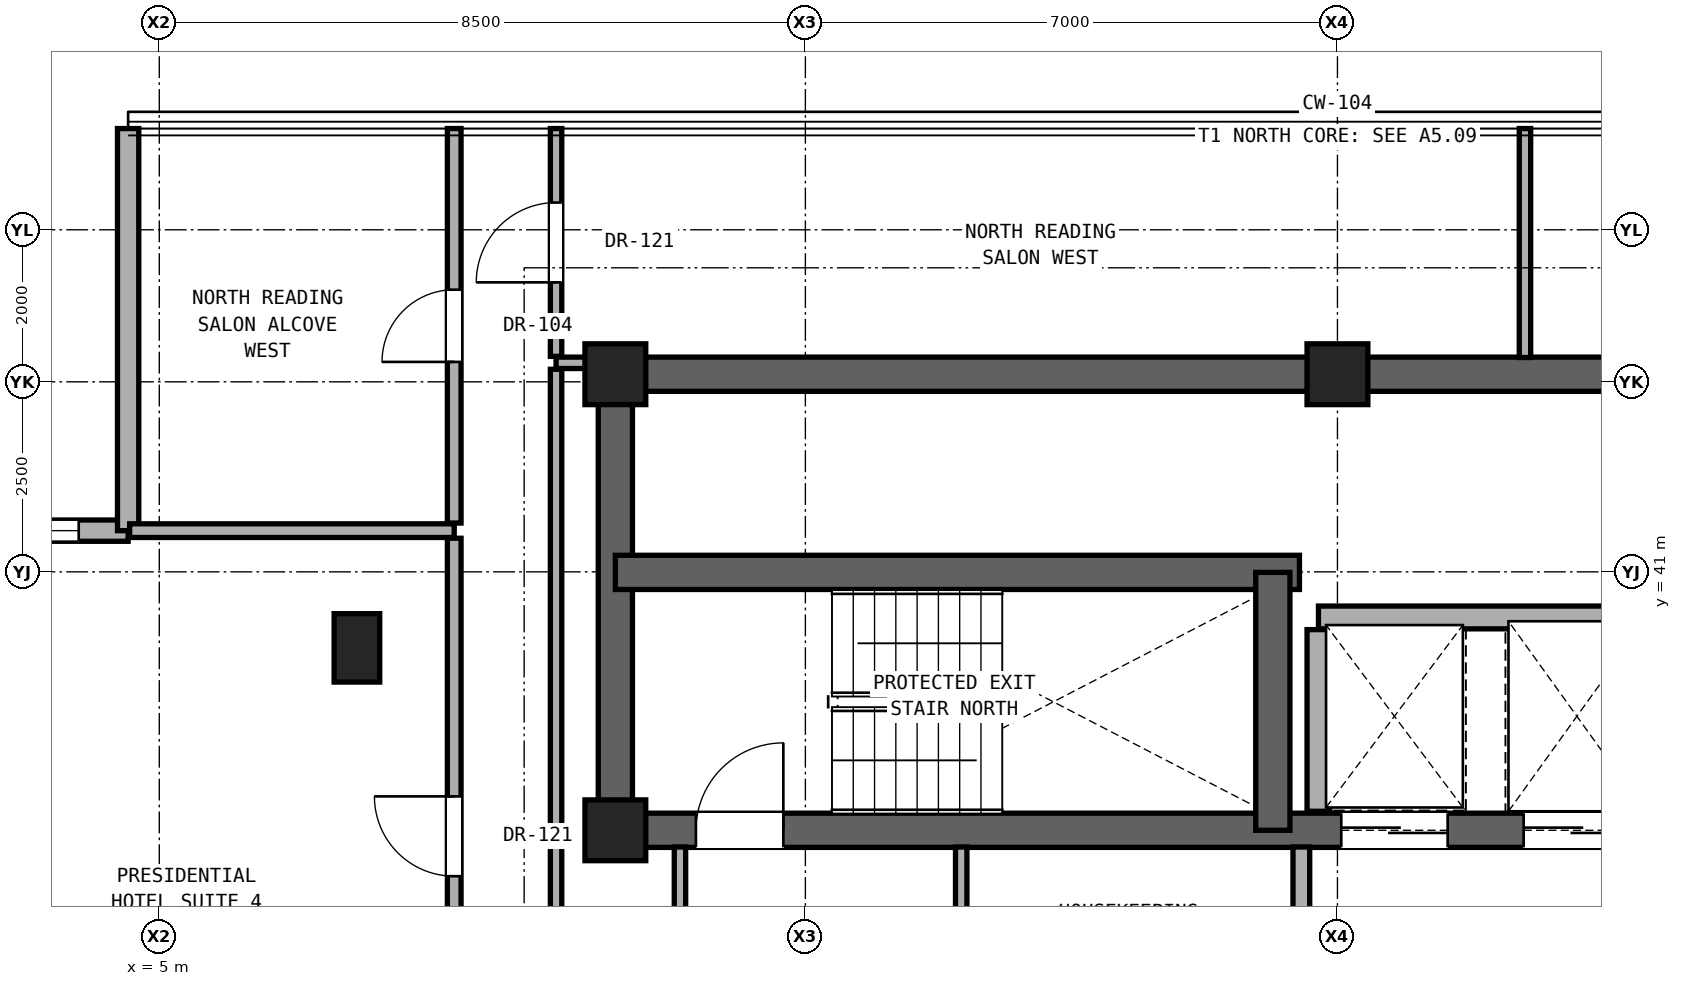
"""IFC4 building model, lengths in metres.
Left out: names, types, materials, properties, quantities, classifications, styles, units other than length and angle.
Written with IfcOpenShell. Run it as: python <this file> out.ifc"""

import sys

from ifc_helpers import new_model, si_unit, direction, frame, frame_2d, origin, origin_2d, place, context, subcontext, project, spatial, rectangle, extrude, element, fill, save


model = new_model("IFC4")
c1 = context("Model", 3, precision=1e-05, world=origin(), true_north=direction((0.0, 1.0)))
c2 = subcontext(c1, "Body", "Model", "MODEL_VIEW")
j1 = project(units=[si_unit("LENGTHUNIT", "METRE"), si_unit("PLANEANGLEUNIT", "RADIAN")], contexts=[c1])
p1 = place(None, origin())
s1 = spatial("IfcSite", under=j1, at=p1, CompositionType="ELEMENT")
p2 = place(p1, origin())
s2 = spatial("IfcBuilding", under=s1, at=p2, CompositionType="ELEMENT")
p3 = place(p2, frame((0.0, 0.0, 232.6)))
s3 = spatial("IfcBuildingStorey", under=s2, at=p3, CompositionType="ELEMENT", Elevation=232.6)
for number, where, z_axis, x_axis in (
    (1, (11.0, 37.6, 0.0), (0.0, 0.0, 1.0), (1.0, 0.0, 0.0)),
    (2, (11.0, 43.6, 0.0), (0.0, 0.0, 1.0), (1.0, 0.0, 0.0)),
    (3, (20.5, 43.6, 0.0), (0.0, 0.0, 1.0), (1.0, 0.0, 0.0)),
):
    element("IfcColumn", number, at=place(p3, frame(where, z_axis=z_axis, x_axis=x_axis)), inside=s3, PredefinedType="COLUMN", context=c2, shape_type="SweptSolid", body=[
        extrude(rectangle(XDim=0.8, YDim=0.8, at=origin_2d()), origin(), (0.0, 0.0, 1.0), 3.3),
    ])
p4 = place(p3, frame((7.6, 40.0, 0.0), z_axis=(0.0, 0.0, 1.0), x_axis=(1.0, 0.0, 0.0)))
e4 = element("IfcColumn", 4, at=p4, inside=s3, PredefinedType="PILASTER", context=c2, shape_type="SweptSolid", body=[
    extrude(rectangle(XDim=0.6, YDim=0.9, at=origin_2d()), origin(), (0.0, 0.0, 1.0), 3.3),
])
p5 = place(p3, frame((11.0, 43.6, 0.0), z_axis=(0.0, 0.0, 1.0), x_axis=(1.0, 0.0, 0.0)))
e5 = element("IfcWall", 5, at=p5, inside=s3, PredefinedType="SHEAR", context=c2, shape_type="SweptSolid", body=[
    extrude(rectangle(XDim=19.0, YDim=0.45, at=frame_2d((9.5, 0.0))), origin(), (0.0, 0.0, 1.0), 3.1),
])
p6 = place(p3, frame((11.0, 37.6, 0.0), z_axis=(0.0, 0.0, 1.0), x_axis=(0.0, 1.0, 0.0)))
e6 = element("IfcWall", 6, at=p6, inside=s3, PredefinedType="SHEAR", context=c2, shape_type="SweptSolid", body=[
    extrude(rectangle(XDim=6.0, YDim=0.45, at=frame_2d((3.0, 0.0))), origin(), (0.0, 0.0, 1.0), 3.1),
])
p7 = place(p3, frame((11.0, 37.6, 0.0), z_axis=(0.0, 0.0, 1.0), x_axis=(1.0, 0.0, 0.0)))
e7 = element("IfcWall", 7, at=p7, inside=s3, PredefinedType="SHEAR", context=c2, shape_type="SweptSolid", body=[
    extrude(rectangle(XDim=19.0, YDim=0.45, at=frame_2d((9.5, 0.0))), origin(), (0.0, 0.0, 1.0), 3.1),
])
p8 = place(p7, frame((1.06, 0.0, 0.0)))
e8 = element("IfcOpeningElement", 8, at=p8, cuts=e7, PredefinedType="OPENING", context=c2, shape_type="SweptSolid", body=[
    extrude(rectangle(XDim=1.15, YDim=2.2, at=frame_2d((0.575, 1.1))), frame((0.0, 0.235, 0.0), z_axis=(0.0, -1.0, 0.0), x_axis=(1.0, 0.0, 0.0)), (0.0, 0.0, 1.0), 0.47),
])
p9 = place(p7, frame((9.55, 0.0, 0.0)))
e9 = element("IfcOpeningElement", 9, at=p9, cuts=e7, PredefinedType="OPENING", context=c2, shape_type="SweptSolid", body=[
    extrude(rectangle(XDim=1.4, YDim=2.35, at=frame_2d((0.7, 1.175))), frame((0.0, 0.235, 0.0), z_axis=(0.0, -1.0, 0.0), x_axis=(1.0, 0.0, 0.0)), (0.0, 0.0, 1.0), 0.47),
])
p10 = place(p7, frame((11.95, 0.0, 0.0)))
e10 = element("IfcOpeningElement", 10, at=p10, cuts=e7, PredefinedType="OPENING", context=c2, shape_type="SweptSolid", body=[
    extrude(rectangle(XDim=1.4, YDim=2.35, at=frame_2d((0.7, 1.175))), frame((0.0, 0.235, 0.0), z_axis=(0.0, -1.0, 0.0), x_axis=(1.0, 0.0, 0.0)), (0.0, 0.0, 1.0), 0.47),
])
p11 = place(p3, frame((11.0, 40.993, 0.0), z_axis=(0.0, 0.0, 1.0), x_axis=(1.0, 0.0, 0.0)))
e11 = element("IfcWall", 11, at=p11, inside=s3, PredefinedType="SHEAR", context=c2, shape_type="SweptSolid", body=[
    extrude(rectangle(XDim=9.0, YDim=0.45, at=frame_2d((4.5, 0.0))), origin(), (0.0, 0.0, 1.0), 3.1),
])
p12 = place(p3, frame((19.65, 37.6, 0.0), z_axis=(0.0, 0.0, 1.0), x_axis=(0.0, 1.0, 0.0)))
e12 = element("IfcWall", 12, at=p12, inside=s3, PredefinedType="SHEAR", context=c2, shape_type="SweptSolid", body=[
    extrude(rectangle(XDim=3.393, YDim=0.45, at=frame_2d((1.696, 0.0))), origin(), (0.0, 0.0, 1.0), 3.1),
])
p13 = place(p3, frame((4.59, 41.542, 0.0), z_axis=(0.0, 0.0, 1.0), x_axis=(-1.0, 0.0, 0.0)))
e13 = element("IfcWall", 13, at=p13, inside=s3, PredefinedType="SOLIDWALL", context=c2, shape_type="SweptSolid", body=[
    extrude(rectangle(XDim=5.29, YDim=0.28, at=frame_2d((2.645, 0.0))), origin(), (0.0, 0.0, 1.0), 3.08),
])
p14 = place(p13, frame((0.65, 0.0, 0.85)))
e14 = element("IfcOpeningElement", 14, at=p14, cuts=e13, PredefinedType="OPENING", context=c2, shape_type="SweptSolid", body=[
    extrude(rectangle(XDim=1.1, YDim=2.0, at=frame_2d((0.55, 1.0))), frame((0.0, 0.15, 0.0), z_axis=(0.0, -1.0, 0.0), x_axis=(1.0, 0.0, 0.0)), (0.0, 0.0, 1.0), 0.3),
])
p15 = place(p3, frame((4.59, 46.832, 0.0), z_axis=(0.0, 0.0, 1.0), x_axis=(0.0, -1.0, 0.0)))
e15 = element("IfcWall", 15, at=p15, inside=s3, PredefinedType="SOLIDWALL", context=c2, shape_type="SweptSolid", body=[
    extrude(rectangle(XDim=5.29, YDim=0.28, at=frame_2d((2.645, 0.0))), origin(), (0.0, 0.0, 1.0), 3.08),
])
p16 = place(p3, frame((20.25, 40.4, 0.0), z_axis=(0.0, 0.0, 1.0), x_axis=(1.0, 0.0, 0.0)))
e16 = element("IfcWall", 16, at=p16, inside=s3, PredefinedType="SOLIDWALL", context=c2, shape_type="SweptSolid", body=[
    extrude(rectangle(XDim=4.4, YDim=0.3, at=frame_2d((2.2, 0.0))), origin(), (0.0, 0.0, 1.0), 3.1),
])
p17 = place(p3, frame((4.61, 41.542, 0.0), z_axis=(0.0, 0.0, 1.0), x_axis=(1.0, 0.0, 0.0)))
e17 = element("IfcWall", 17, at=p17, inside=s3, PredefinedType="PARTITIONING", context=c2, shape_type="SweptSolid", body=[
    extrude(rectangle(XDim=4.27, YDim=0.18, at=frame_2d((2.135, 0.0))), origin(), (0.0, 0.0, 1.0), 3.1),
])
p18 = place(p3, frame((10.22, 43.75, 0.0), z_axis=(0.0, 0.0, 1.0), x_axis=(1.0, 0.0, 0.0)))
e18 = element("IfcWall", 18, at=p18, inside=s3, PredefinedType="PARTITIONING", context=c2, shape_type="SweptSolid", body=[
    extrude(rectangle(XDim=0.56, YDim=0.15, at=frame_2d((0.28, 0.0))), origin(), (0.0, 0.0, 1.0), 3.1),
])
p19 = place(p3, frame((8.88, 33.6, 0.0), z_axis=(0.0, 0.0, 1.0), x_axis=(0.0, 1.0, 0.0)))
e19 = element("IfcWall", 19, at=p19, inside=s3, PredefinedType="PARTITIONING", context=c2, shape_type="SweptSolid", body=[
    extrude(rectangle(XDim=7.842, YDim=0.18, at=frame_2d((3.921, 0.0))), origin(), (0.0, 0.0, 1.0), 2.492),
])
p20 = place(p19, frame((3.396, 0.0, 0.0)))
e20 = element("IfcOpeningElement", 20, at=p20, cuts=e19, PredefinedType="OPENING", context=c2, shape_type="SweptSolid", body=[
    extrude(rectangle(XDim=1.05, YDim=2.2, at=frame_2d((0.525, 1.1))), frame((0.0, 0.1, 0.0), z_axis=(0.0, -1.0, 0.0), x_axis=(1.0, 0.0, 0.0)), (0.0, 0.0, 1.0), 0.2),
])
p21 = place(p3, frame((8.88, 41.642, 0.0), z_axis=(0.0, 0.0, 1.0), x_axis=(0.0, 1.0, 0.0)))
e21 = element("IfcWall", 21, at=p21, inside=s3, PredefinedType="PARTITIONING", context=c2, shape_type="SweptSolid", body=[
    extrude(rectangle(XDim=5.19, YDim=0.18, at=frame_2d((2.595, 0.0))), origin(), (0.0, 0.0, 1.0), 3.1),
])
p22 = place(p21, frame((2.12, 0.0, 0.0)))
e22 = element("IfcOpeningElement", 22, at=p22, cuts=e21, PredefinedType="OPENING", context=c2, shape_type="SweptSolid", body=[
    extrude(rectangle(XDim=0.95, YDim=2.15, at=frame_2d((0.475, 1.075))), frame((0.0, 0.1, 0.0), z_axis=(0.0, -1.0, 0.0), x_axis=(1.0, 0.0, 0.0)), (0.0, 0.0, 1.0), 0.2),
])
p23 = place(p3, frame((10.22, 34.535, 0.0), z_axis=(0.0, 0.0, 1.0), x_axis=(0.0, 1.0, 0.0)))
e23 = element("IfcWall", 23, at=p23, inside=s3, PredefinedType="PARTITIONING", context=c2, shape_type="SweptSolid", body=[
    extrude(rectangle(XDim=9.13, YDim=0.15, at=frame_2d((4.565, 0.0))), origin(), (0.0, 0.0, 1.0), 2.492),
])
p24 = place(p3, frame((10.22, 43.835, 0.0), z_axis=(0.0, 0.0, 1.0), x_axis=(0.0, 1.0, 0.0)))
e24 = element("IfcWall", 24, at=p24, inside=s3, PredefinedType="PARTITIONING", context=c2, shape_type="SweptSolid", body=[
    extrude(rectangle(XDim=2.997, YDim=0.15, at=frame_2d((1.499, 0.0))), origin(), (0.0, 0.0, 1.0), 3.1),
])
p25 = place(p24, frame((0.973, 0.0, 0.0)))
e25 = element("IfcOpeningElement", 25, at=p25, cuts=e24, PredefinedType="OPENING", context=c2, shape_type="SweptSolid", body=[
    extrude(rectangle(XDim=1.05, YDim=2.2, at=frame_2d((0.525, 1.1))), frame((0.0, 0.085, 0.0), z_axis=(0.0, -1.0, 0.0), x_axis=(1.0, 0.0, 0.0)), (0.0, 0.0, 1.0), 0.17),
])
p26 = place(p3, frame((11.85, 34.535, 0.0), z_axis=(0.0, 0.0, 1.0), x_axis=(0.0, 1.0, 0.0)))
e26 = element("IfcWall", 26, at=p26, inside=s3, PredefinedType="PARTITIONING", context=c2, shape_type="SweptSolid", body=[
    extrude(rectangle(XDim=2.845, YDim=0.15, at=frame_2d((1.422, 0.0))), origin(), (0.0, 0.0, 1.0), 3.1),
])
p27 = place(p3, frame((15.55, 34.57, 0.0), z_axis=(0.0, 0.0, 1.0), x_axis=(0.0, 1.0, 0.0)))
e27 = element("IfcWall", 27, at=p27, inside=s3, PredefinedType="PARTITIONING", context=c2, shape_type="SweptSolid", body=[
    extrude(rectangle(XDim=2.81, YDim=0.15, at=frame_2d((1.405, 0.0))), origin(), (0.0, 0.0, 1.0), 3.1),
])
p28 = place(p3, frame((20.025, 34.57, 0.0), z_axis=(0.0, 0.0, 1.0), x_axis=(0.0, 1.0, 0.0)))
e28 = element("IfcWall", 28, at=p28, inside=s3, PredefinedType="SOLIDWALL", context=c2, shape_type="SweptSolid", body=[
    extrude(rectangle(XDim=2.81, YDim=0.22, at=frame_2d((1.405, 0.0))), origin(), (0.0, 0.0, 1.0), 3.1),
])
p29 = place(p3, frame((20.25, 37.85, 0.0), z_axis=(0.0, 0.0, 1.0), x_axis=(0.0, 1.0, 0.0)))
e29 = element("IfcWall", 29, at=p29, inside=s3, PredefinedType="SOLIDWALL", context=c2, shape_type="SweptSolid", body=[
    extrude(rectangle(XDim=2.39, YDim=0.3, at=frame_2d((1.195, 0.0))), origin(), (0.0, 0.0, 1.0), 3.1),
])
p30 = place(p3, frame((22.967, 43.82, 0.0), z_axis=(0.0, 0.0, 1.0), x_axis=(0.0, 1.0, 0.0)))
e30 = element("IfcWall", 30, at=p30, inside=s3, PredefinedType="PARTITIONING", context=c2, shape_type="SweptSolid", body=[
    extrude(rectangle(XDim=3.012, YDim=0.15, at=frame_2d((1.506, 0.0))), origin(), (0.0, 0.0, 1.0), 3.1),
])
p31 = place(p14, origin())
e31 = element("IfcWindow", 31, at=p31, inside=s3, PartitioningType="SINGLE_PANEL", PredefinedType="WINDOW", context=c2, shape_type="SweptSolid", body=[
    extrude(rectangle(XDim=1.1, YDim=2.0, at=frame_2d((0.55, 1.0))), frame((0.0, 0.03, 0.0), z_axis=(0.0, -1.0, 0.0), x_axis=(1.0, 0.0, 0.0)), (0.0, 0.0, 1.0), 0.06),
])
fill(e14, e31)
p32 = place(p8, origin())
e32 = element("IfcDoor", 32, at=p32, inside=s3, OperationType="SINGLE_SWING_RIGHT", PredefinedType="DOOR", context=c2, shape_type="SweptSolid", body=[
    extrude(rectangle(XDim=1.15, YDim=2.2, at=frame_2d((0.575, 1.1))), frame((0.0, 0.025, 0.0), z_axis=(0.0, -1.0, 0.0), x_axis=(1.0, 0.0, 0.0)), (0.0, 0.0, 1.0), 0.05),
])
fill(e8, e32)
p33 = place(p20, origin())
e33 = element("IfcDoor", 33, at=p33, inside=s3, OperationType="SINGLE_SWING_RIGHT", PredefinedType="DOOR", context=c2, shape_type="SweptSolid", body=[
    extrude(rectangle(XDim=1.05, YDim=2.2, at=frame_2d((0.525, 1.1))), frame((0.0, 0.025, 0.0), z_axis=(0.0, -1.0, 0.0), x_axis=(1.0, 0.0, 0.0)), (0.0, 0.0, 1.0), 0.05),
])
fill(e20, e33)
p34 = place(p25, origin())
e34 = element("IfcDoor", 34, at=p34, inside=s3, OperationType="SINGLE_SWING_LEFT", PredefinedType="DOOR", context=c2, shape_type="SweptSolid", body=[
    extrude(rectangle(XDim=1.05, YDim=2.2, at=frame_2d((0.525, 1.1))), frame((0.0, 0.025, 0.0), z_axis=(0.0, -1.0, 0.0), x_axis=(1.0, 0.0, 0.0)), (0.0, 0.0, 1.0), 0.05),
])
fill(e25, e34)
p35 = place(p22, origin())
e35 = element("IfcDoor", 35, at=p35, inside=s3, OperationType="SINGLE_SWING_LEFT", PredefinedType="DOOR", context=c2, shape_type="SweptSolid", body=[
    extrude(rectangle(XDim=0.95, YDim=2.15, at=frame_2d((0.475, 1.075))), frame((0.0, 0.025, 0.0), z_axis=(0.0, -1.0, 0.0), x_axis=(1.0, 0.0, 0.0)), (0.0, 0.0, 1.0), 0.05),
])
fill(e22, e35)
p36 = place(p9, origin())
e36 = element("IfcDoor", 36, at=p36, inside=s3, OperationType="DOUBLE_DOOR_SLIDING", PredefinedType="DOOR", context=c2, shape_type="SweptSolid", body=[
    extrude(rectangle(XDim=1.4, YDim=2.35, at=frame_2d((0.7, 1.175))), frame((0.0, 0.025, 0.0), z_axis=(0.0, -1.0, 0.0), x_axis=(1.0, 0.0, 0.0)), (0.0, 0.0, 1.0), 0.05),
])
fill(e9, e36)
p37 = place(p10, origin())
e37 = element("IfcDoor", 37, at=p37, inside=s3, OperationType="DOUBLE_DOOR_SLIDING", PredefinedType="DOOR", context=c2, shape_type="SweptSolid", body=[
    extrude(rectangle(XDim=1.4, YDim=2.35, at=frame_2d((0.7, 1.175))), frame((0.0, 0.025, 0.0), z_axis=(0.0, -1.0, 0.0), x_axis=(1.0, 0.0, 0.0)), (0.0, 0.0, 1.0), 0.05),
])
fill(e10, e37)
save(model, sys.argv[1])
